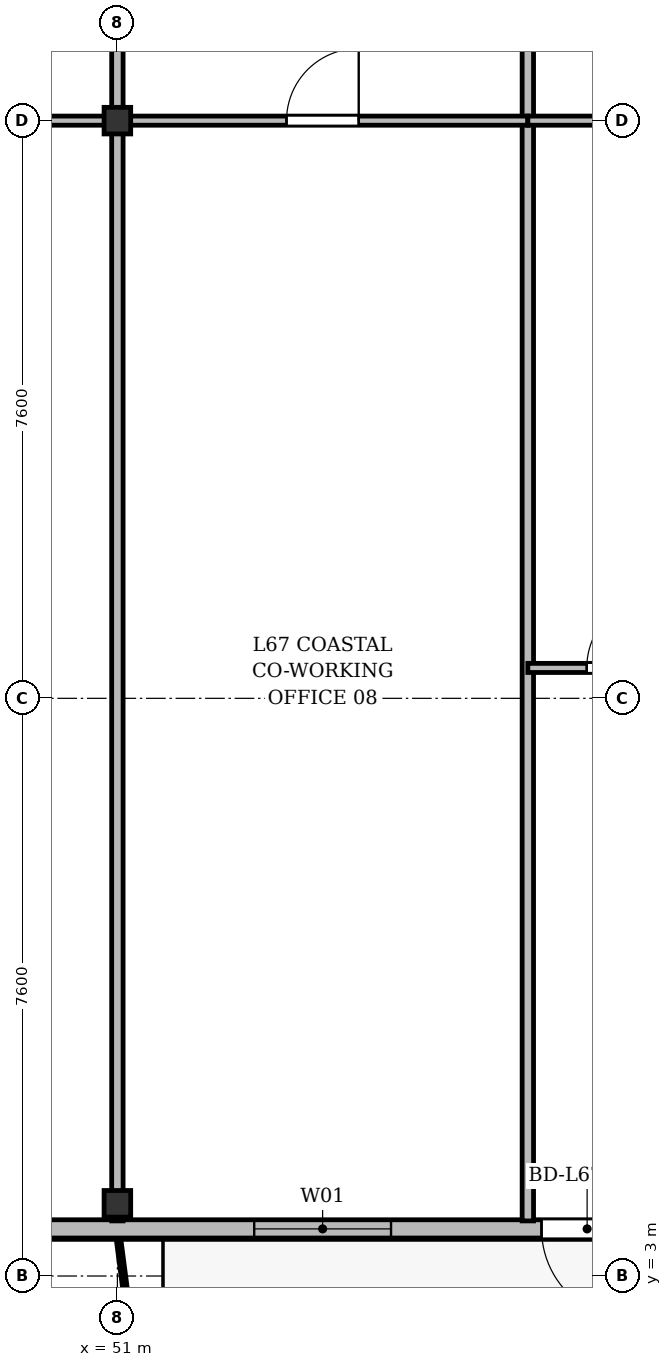
"""IFC4 building model, lengths in metres.
Left out: names, types, materials, properties, quantities, classifications, styles, units other than length and angle.
Written with IfcOpenShell. Run it as: python <this file> out.ifc"""

import sys

from ifc_helpers import new_model, si_unit, direction, frame, frame_2d, origin, origin_2d, place, context, subcontext, project, spatial, rectangle, i_section, extrude, source, transform, mapped, element, fill, save


model = new_model("IFC4")
c1 = context("Model", 3, precision=1e-05, world=origin(), true_north=direction((0.0, 1.0)))
c2 = subcontext(c1, "Body", "Model", "MODEL_VIEW")
j1 = project(units=[si_unit("LENGTHUNIT", "METRE"), si_unit("PLANEANGLEUNIT", "RADIAN")], contexts=[c1])
p1 = place(None, origin())
s1 = spatial("IfcSite", under=j1, at=p1, CompositionType="ELEMENT")
p2 = place(p1, origin())
s2 = spatial("IfcBuilding", under=s1, at=p2, CompositionType="ELEMENT")
p3 = place(p2, frame((0.0, 0.0, 259.5)))
s3 = spatial("IfcBuildingStorey", under=s2, at=p3, CompositionType="ELEMENT", Elevation=259.5)
m1 = source(origin(), c2, "Body", "SweptSolid", [
    extrude(i_section(OverallWidth=0.35, OverallDepth=0.35, WebThickness=0.018, FlangeThickness=0.028, at=origin_2d()), origin(), (0.0, 0.0, 1.0), 3.6),
])
for number, where, z_axis, x_axis in (
    (1, (51.0, 3.95, 0.0), (0.0, 0.0, 1.0), (1.0, 0.0, 0.0)),
    (2, (51.0, 18.2, 0.0), (0.0, 0.0, 1.0), (1.0, 0.0, 0.0)),
):
    element("IfcColumn", number, at=place(p3, frame(where, z_axis=z_axis, x_axis=x_axis)), inside=s3, PredefinedType="COLUMN", context=c2, shape_type="MappedRepresentation", body=[
        mapped(m1, transform((0.0, 0.0, 0.0), x_axis=(1.0, 0.0, 0.0), y_axis=(0.0, 1.0, 0.0), z_axis=(0.0, 0.0, 1.0), scale=1.0)),
    ])
p4 = place(p3, frame((63.2, 3.62, 0.0), z_axis=(0.0, 0.0, 1.0), x_axis=(-1.0, 0.0, 0.0)))
e3 = element("IfcWall", 3, at=p4, inside=s3, PredefinedType="SOLIDWALL", context=c2, shape_type="SweptSolid", body=[
    extrude(rectangle(XDim=52.0, YDim=0.24, at=frame_2d((26.0, 0.0))), origin(), (0.0, 0.0, 1.0), 3.37),
])
p5 = place(p4, frame((0.345, 0.0, 0.9)))
e4 = element("IfcOpeningElement", 4, at=p5, cuts=e3, PredefinedType="OPENING", context=c2, shape_type="SweptSolid", body=[
    extrude(rectangle(XDim=1.2, YDim=1.65, at=frame_2d((0.6, 0.825))), frame((0.0, 0.13, 0.0), z_axis=(0.0, -1.0, 0.0), x_axis=(1.0, 0.0, 0.0)), (0.0, 0.0, 1.0), 0.26),
])
p6 = place(p4, frame((2.05, 0.0, 0.9)))
e5 = element("IfcOpeningElement", 5, at=p6, cuts=e3, PredefinedType="OPENING", context=c2, shape_type="SweptSolid", body=[
    extrude(rectangle(XDim=2.0, YDim=1.95, at=frame_2d((1.0, 0.975))), frame((0.0, 0.13, 0.0), z_axis=(0.0, -1.0, 0.0), x_axis=(1.0, 0.0, 0.0)), (0.0, 0.0, 1.0), 0.26),
])
p7 = place(p4, frame((5.42, 0.0, 0.0)))
e6 = element("IfcOpeningElement", 6, at=p7, cuts=e3, PredefinedType="OPENING", context=c2, shape_type="SweptSolid", body=[
    extrude(rectangle(XDim=1.2, YDim=2.2, at=frame_2d((0.6, 1.1))), frame((0.0, 0.13, 0.0), z_axis=(0.0, -1.0, 0.0), x_axis=(1.0, 0.0, 0.0)), (0.0, 0.0, 1.0), 0.26),
])
p8 = place(p4, frame((8.6, 0.0, 0.9)))
e7 = element("IfcOpeningElement", 7, at=p8, cuts=e3, PredefinedType="OPENING", context=c2, shape_type="SweptSolid", body=[
    extrude(rectangle(XDim=1.8, YDim=1.8, at=frame_2d((0.9, 0.9))), frame((0.0, 0.13, 0.0), z_axis=(0.0, -1.0, 0.0), x_axis=(1.0, 0.0, 0.0)), (0.0, 0.0, 1.0), 0.26),
])
p9 = place(p4, frame((14.7, 0.0, 0.9)))
e8 = element("IfcOpeningElement", 8, at=p9, cuts=e3, PredefinedType="OPENING", context=c2, shape_type="SweptSolid", body=[
    extrude(rectangle(XDim=2.2, YDim=1.8, at=frame_2d((1.1, 0.9))), frame((0.0, 0.13, 0.0), z_axis=(0.0, -1.0, 0.0), x_axis=(1.0, 0.0, 0.0)), (0.0, 0.0, 1.0), 0.26),
])
p10 = place(p4, frame((20.5, 0.0, 0.9)))
e9 = element("IfcOpeningElement", 9, at=p10, cuts=e3, PredefinedType="OPENING", context=c2, shape_type="SweptSolid", body=[
    extrude(rectangle(XDim=1.5, YDim=1.75, at=frame_2d((0.75, 0.875))), frame((0.0, 0.13, 0.0), z_axis=(0.0, -1.0, 0.0), x_axis=(1.0, 0.0, 0.0)), (0.0, 0.0, 1.0), 0.26),
])
p11 = place(p4, frame((23.95, 0.0, 0.9)))
e10 = element("IfcOpeningElement", 10, at=p11, cuts=e3, PredefinedType="OPENING", context=c2, shape_type="SweptSolid", body=[
    extrude(rectangle(XDim=2.0, YDim=1.95, at=frame_2d((1.0, 0.975))), frame((0.0, 0.13, 0.0), z_axis=(0.0, -1.0, 0.0), x_axis=(1.0, 0.0, 0.0)), (0.0, 0.0, 1.0), 0.26),
])
p12 = place(p4, frame((28.875, 0.0, 0.9)))
e11 = element("IfcOpeningElement", 11, at=p12, cuts=e3, PredefinedType="OPENING", context=c2, shape_type="SweptSolid", body=[
    extrude(rectangle(XDim=1.65, YDim=1.85, at=frame_2d((0.825, 0.925))), frame((0.0, 0.13, 0.0), z_axis=(0.0, -1.0, 0.0), x_axis=(1.0, 0.0, 0.0)), (0.0, 0.0, 1.0), 0.26),
])
p13 = place(p4, frame((34.078, 0.0, 0.0)))
e12 = element("IfcOpeningElement", 12, at=p13, cuts=e3, PredefinedType="OPENING", context=c2, shape_type="SweptSolid", body=[
    extrude(rectangle(XDim=1.2, YDim=2.2, at=frame_2d((0.6, 1.1))), frame((0.0, 0.13, 0.0), z_axis=(0.0, -1.0, 0.0), x_axis=(1.0, 0.0, 0.0)), (0.0, 0.0, 1.0), 0.26),
])
p14 = place(p4, frame((36.9, 0.0, 0.9)))
e13 = element("IfcOpeningElement", 13, at=p14, cuts=e3, PredefinedType="OPENING", context=c2, shape_type="SweptSolid", body=[
    extrude(rectangle(XDim=2.2, YDim=1.8, at=frame_2d((1.1, 0.9))), frame((0.0, 0.13, 0.0), z_axis=(0.0, -1.0, 0.0), x_axis=(1.0, 0.0, 0.0)), (0.0, 0.0, 1.0), 0.26),
])
p15 = place(p4, frame((41.15, 0.0, 0.9)))
e14 = element("IfcOpeningElement", 14, at=p15, cuts=e3, PredefinedType="OPENING", context=c2, shape_type="SweptSolid", body=[
    extrude(rectangle(XDim=1.5, YDim=1.75, at=frame_2d((0.75, 0.875))), frame((0.0, 0.13, 0.0), z_axis=(0.0, -1.0, 0.0), x_axis=(1.0, 0.0, 0.0)), (0.0, 0.0, 1.0), 0.26),
])
p16 = place(p4, frame((44.19, 0.0, 0.9)))
e15 = element("IfcOpeningElement", 15, at=p16, cuts=e3, PredefinedType="OPENING", context=c2, shape_type="SweptSolid", body=[
    extrude(rectangle(XDim=2.0, YDim=1.95, at=frame_2d((1.0, 0.975))), frame((0.0, 0.13, 0.0), z_axis=(0.0, -1.0, 0.0), x_axis=(1.0, 0.0, 0.0)), (0.0, 0.0, 1.0), 0.26),
])
p17 = place(p4, frame((49.93, 0.0, 0.9)))
e16 = element("IfcOpeningElement", 16, at=p17, cuts=e3, PredefinedType="OPENING", context=c2, shape_type="SweptSolid", body=[
    extrude(rectangle(XDim=1.65, YDim=1.85, at=frame_2d((0.825, 0.925))), frame((0.0, 0.13, 0.0), z_axis=(0.0, -1.0, 0.0), x_axis=(1.0, 0.0, 0.0)), (0.0, 0.0, 1.0), 0.26),
])
p18 = place(p3, frame((51.0, 3.725, 0.0), z_axis=(0.0, 0.0, 1.0), x_axis=(0.0, 1.0, 0.0)))
e17 = element("IfcWall", 17, at=p18, inside=s3, PredefinedType="PARTITIONING", context=c2, shape_type="SweptSolid", body=[
    extrude(rectangle(XDim=27.275, YDim=0.15, at=frame_2d((13.637, 0.0))), origin(), (0.0, 0.0, 1.0), 2.87),
])
p19 = place(p3, frame((56.4, 3.725, 0.0), z_axis=(0.0, 0.0, 1.0), x_axis=(0.0, 1.0, 0.0)))
e18 = element("IfcWall", 18, at=p19, inside=s3, PredefinedType="PARTITIONING", context=c2, shape_type="SweptSolid", body=[
    extrude(rectangle(XDim=27.275, YDim=0.15, at=frame_2d((13.637, 0.0))), origin(), (0.0, 0.0, 1.0), 2.92),
])
p20 = place(p3, frame((43.8, 18.2, 0.0), z_axis=(0.0, 0.0, 1.0), x_axis=(1.0, 0.0, 0.0)))
e19 = element("IfcWall", 19, at=p20, inside=s3, PredefinedType="PARTITIONING", context=c2, shape_type="SweptSolid", body=[
    extrude(rectangle(XDim=7.2, YDim=0.12, at=frame_2d((3.6, 0.0))), origin(), (0.0, 0.0, 1.0), 2.92),
])
p21 = place(p20, frame((3.125, 0.0, 0.0)))
e20 = element("IfcOpeningElement", 20, at=p21, cuts=e19, PredefinedType="OPENING", context=c2, shape_type="SweptSolid", body=[
    extrude(rectangle(XDim=0.95, YDim=2.15, at=frame_2d((0.475, 1.075))), frame((0.0, 0.07, 0.0), z_axis=(0.0, -1.0, 0.0), x_axis=(1.0, 0.0, 0.0)), (0.0, 0.0, 1.0), 0.14),
])
p22 = place(p3, frame((51.0, 18.2, 0.0), z_axis=(0.0, 0.0, 1.0), x_axis=(1.0, 0.0, 0.0)))
e21 = element("IfcWall", 21, at=p22, inside=s3, PredefinedType="PARTITIONING", context=c2, shape_type="SweptSolid", body=[
    extrude(rectangle(XDim=5.4, YDim=0.12, at=frame_2d((2.7, 0.0))), origin(), (0.0, 0.0, 1.0), 2.92),
])
p23 = place(p22, frame((2.225, 0.0, 0.0)))
e22 = element("IfcOpeningElement", 22, at=p23, cuts=e21, PredefinedType="OPENING", context=c2, shape_type="SweptSolid", body=[
    extrude(rectangle(XDim=0.95, YDim=2.15, at=frame_2d((0.475, 1.075))), frame((0.0, 0.07, 0.0), z_axis=(0.0, -1.0, 0.0), x_axis=(1.0, 0.0, 0.0)), (0.0, 0.0, 1.0), 0.14),
])
p24 = place(p3, frame((56.4, 18.2, 0.0), z_axis=(0.0, 0.0, 1.0), x_axis=(1.0, 0.0, 0.0)))
e23 = element("IfcWall", 23, at=p24, inside=s3, PredefinedType="PARTITIONING", context=c2, shape_type="SweptSolid", body=[
    extrude(rectangle(XDim=5.0, YDim=0.12, at=frame_2d((2.5, 0.0))), origin(), (0.0, 0.0, 1.0), 2.92),
])
p25 = place(p24, frame((3.487, 0.0, 0.0)))
e24 = element("IfcOpeningElement", 24, at=p25, cuts=e23, PredefinedType="OPENING", context=c2, shape_type="SweptSolid", body=[
    extrude(rectangle(XDim=0.95, YDim=2.15, at=frame_2d((0.475, 1.075))), frame((0.0, 0.07, 0.0), z_axis=(0.0, -1.0, 0.0), x_axis=(1.0, 0.0, 0.0)), (0.0, 0.0, 1.0), 0.14),
])
p26 = place(p3, frame((56.4, 11.0, 0.0), z_axis=(0.0, 0.0, 1.0), x_axis=(1.0, 0.0, 0.0)))
e25 = element("IfcWall", 25, at=p26, inside=s3, PredefinedType="PARTITIONING", context=c2, shape_type="SweptSolid", body=[
    extrude(rectangle(XDim=2.5, YDim=0.12, at=frame_2d((1.25, 0.0))), origin(), (0.0, 0.0, 1.0), 2.87),
])
p27 = place(p26, frame((0.775, 0.0, 0.0)))
e26 = element("IfcOpeningElement", 26, at=p27, cuts=e25, PredefinedType="OPENING", context=c2, shape_type="SweptSolid", body=[
    extrude(rectangle(XDim=0.95, YDim=2.15, at=frame_2d((0.475, 1.075))), frame((0.0, 0.07, 0.0), z_axis=(0.0, -1.0, 0.0), x_axis=(1.0, 0.0, 0.0)), (0.0, 0.0, 1.0), 0.14),
])
m2 = source(origin(), c2, "Body", "SweptSolid", [
    extrude(rectangle(XDim=1.2, YDim=2.2, at=frame_2d((0.6, 1.1))), frame((0.0, 0.025, 0.0), z_axis=(0.0, -1.0, 0.0), x_axis=(1.0, 0.0, 0.0)), (0.0, 0.0, 1.0), 0.05),
])
p28 = place(p7, origin())
e27 = element("IfcDoor", 27, at=p28, inside=s3, OperationType="SINGLE_SWING_LEFT", PredefinedType="DOOR", context=c2, shape_type="MappedRepresentation", body=[
    mapped(m2, transform((0.0, 0.0, 0.0), x_axis=(1.0, 0.0, 0.0), y_axis=(0.0, 1.0, 0.0), z_axis=(0.0, 0.0, 1.0), scale=1.0)),
])
fill(e6, e27)
m3 = source(origin(), c2, "Body", "SweptSolid", [
    extrude(rectangle(XDim=1.8, YDim=1.8, at=frame_2d((0.9, 0.9))), frame((0.0, 0.03, 0.0), z_axis=(0.0, -1.0, 0.0), x_axis=(1.0, 0.0, 0.0)), (0.0, 0.0, 1.0), 0.06),
])
p29 = place(p8, origin())
e28 = element("IfcWindow", 28, at=p29, inside=s3, PartitioningType="SINGLE_PANEL", PredefinedType="WINDOW", context=c2, shape_type="MappedRepresentation", body=[
    mapped(m3, transform((0.0, 0.0, 0.0), x_axis=(1.0, 0.0, 0.0), y_axis=(0.0, 1.0, 0.0), z_axis=(0.0, 0.0, 1.0), scale=1.0)),
])
fill(e7, e28)
m4 = source(origin(), c2, "Body", "SweptSolid", [
    extrude(rectangle(XDim=0.95, YDim=2.15, at=frame_2d((0.475, 1.075))), frame((0.0, 0.025, 0.0), z_axis=(0.0, -1.0, 0.0), x_axis=(1.0, 0.0, 0.0)), (0.0, 0.0, 1.0), 0.05),
])
p30 = place(p23, origin())
e29 = element("IfcDoor", 29, at=p30, inside=s3, OperationType="SINGLE_SWING_RIGHT", PredefinedType="DOOR", context=c2, shape_type="MappedRepresentation", body=[
    mapped(m4, transform((0.0, 0.0, 0.0), x_axis=(1.0, 0.0, 0.0), y_axis=(0.0, 1.0, 0.0), z_axis=(0.0, 0.0, 1.0), scale=1.0)),
])
fill(e22, e29)
p31 = place(p27, origin())
e30 = element("IfcDoor", 30, at=p31, inside=s3, OperationType="SINGLE_SWING_RIGHT", PredefinedType="DOOR", context=c2, shape_type="MappedRepresentation", body=[
    mapped(m4, transform((0.0, 0.0, 0.0), x_axis=(1.0, 0.0, 0.0), y_axis=(0.0, 1.0, 0.0), z_axis=(0.0, 0.0, 1.0), scale=1.0)),
])
fill(e26, e30)
save(model, sys.argv[1])
